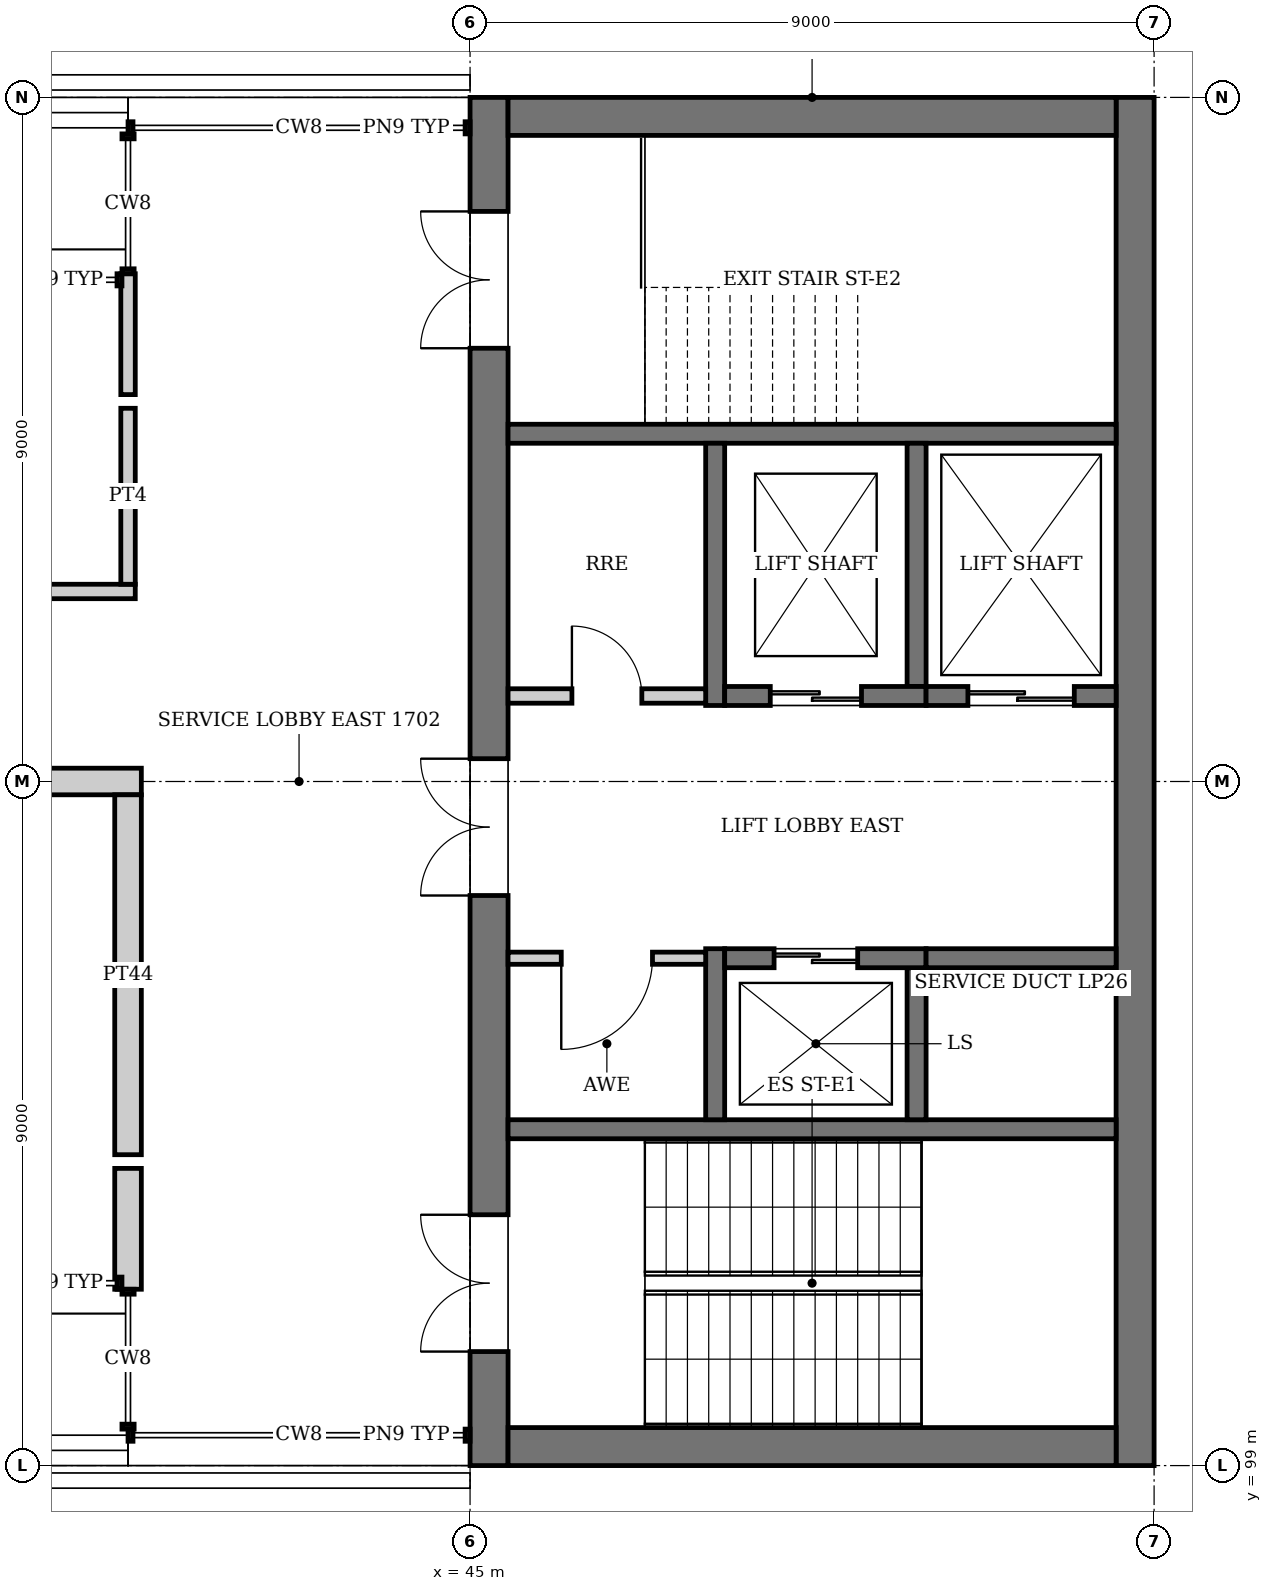
"""IFC4 building model, lengths in metres.
Left out: names, types, materials, properties, quantities, classifications, styles, units other than length and angle.
Written with IfcOpenShell. Run it as: python <this file> out.ifc"""

import sys

from ifc_helpers import new_model, si_unit, direction, frame, frame_2d, origin, place, context, subcontext, project, spatial, rectangle, extrude, element, fill, save


model = new_model("IFC4")
c1 = context("Model", 3, precision=1e-05, world=origin(), true_north=direction((0.0, 1.0)))
c2 = subcontext(c1, "Body", "Model", "MODEL_VIEW")
j1 = project(units=[si_unit("LENGTHUNIT", "METRE"), si_unit("PLANEANGLEUNIT", "RADIAN")], contexts=[c1])
p1 = place(None, origin())
s1 = spatial("IfcSite", under=j1, at=p1, CompositionType="ELEMENT")
p2 = place(p1, origin())
s2 = spatial("IfcBuilding", under=s1, at=p2, CompositionType="ELEMENT")
p3 = place(p2, frame((0.0, 0.0, 71.2)))
s3 = spatial("IfcBuildingStorey", under=s2, at=p3, CompositionType="ELEMENT", Elevation=71.2)
p4 = place(p3, frame((45.25, 99.0, 0.0), z_axis=(0.0, 0.0, 1.0), x_axis=(0.0, 1.0, 0.0)))
e1 = element("IfcWall", 1, at=p4, inside=s3, PredefinedType="SHEAR", context=c2, shape_type="SweptSolid", body=[
    extrude(rectangle(XDim=18.0, YDim=0.5, at=frame_2d((9.0, 0.0))), origin(), (0.0, 0.0, 1.0), 4.65),
])
p5 = place(p4, frame((1.5, 0.0, 0.0)))
e2 = element("IfcOpeningElement", 2, at=p5, cuts=e1, PredefinedType="OPENING", context=c2, shape_type="SweptSolid", body=[
    extrude(rectangle(XDim=1.8, YDim=2.1, at=frame_2d((0.9, 1.05))), frame((0.0, 0.26, 0.0), z_axis=(0.0, -1.0, 0.0), x_axis=(1.0, 0.0, 0.0)), (0.0, 0.0, 1.0), 0.52),
])
p6 = place(p4, frame((14.7, 0.0, 0.0)))
e3 = element("IfcOpeningElement", 3, at=p6, cuts=e1, PredefinedType="OPENING", context=c2, shape_type="SweptSolid", body=[
    extrude(rectangle(XDim=1.8, YDim=2.1, at=frame_2d((0.9, 1.05))), frame((0.0, 0.26, 0.0), z_axis=(0.0, -1.0, 0.0), x_axis=(1.0, 0.0, 0.0)), (0.0, 0.0, 1.0), 0.52),
])
p7 = place(p4, frame((7.5, 0.0, 0.0)))
e4 = element("IfcOpeningElement", 4, at=p7, cuts=e1, PredefinedType="OPENING", context=c2, shape_type="SweptSolid", body=[
    extrude(rectangle(XDim=1.8, YDim=2.1, at=frame_2d((0.9, 1.05))), frame((0.0, 0.26, 0.0), z_axis=(0.0, -1.0, 0.0), x_axis=(1.0, 0.0, 0.0)), (0.0, 0.0, 1.0), 0.52),
])
p8 = place(p3, frame((53.75, 99.0, 0.0), z_axis=(0.0, 0.0, 1.0), x_axis=(0.0, 1.0, 0.0)))
e5 = element("IfcWall", 5, at=p8, inside=s3, PredefinedType="SHEAR", context=c2, shape_type="SweptSolid", body=[
    extrude(rectangle(XDim=18.0, YDim=0.5, at=frame_2d((9.0, 0.0))), origin(), (0.0, 0.0, 1.0), 4.65),
])
for number, where, z_axis, x_axis in (
    (6, (45.5, 99.25, 0.0), (0.0, 0.0, 1.0), (1.0, 0.0, 0.0)),
    (7, (45.5, 116.75, 0.0), (0.0, 0.0, 1.0), (1.0, 0.0, 0.0)),
):
    element("IfcWall", number, at=place(p3, frame(where, z_axis=z_axis, x_axis=x_axis)), inside=s3, PredefinedType="SHEAR", context=c2, shape_type="SweptSolid", body=[
        extrude(rectangle(XDim=8.0, YDim=0.5, at=frame_2d((4.0, 0.0))), origin(), (0.0, 0.0, 1.0), 4.65),
    ])
for number, where, z_axis, x_axis in (
    (8, (13.5, 99.3, 0.0), (0.0, 0.0, 1.0), (1.0, 0.0, 0.0)),
    (9, (13.5, 116.7, 0.0), (0.0, 0.0, 1.0), (1.0, 0.0, 0.0)),
):
    element("IfcWall", number, at=place(p3, frame(where, z_axis=z_axis, x_axis=x_axis)), inside=s3, PredefinedType="PARAPET", context=c2, shape_type="SweptSolid", body=[
        extrude(rectangle(XDim=27.0, YDim=0.2, at=frame_2d((13.5, 0.0))), origin(), (0.0, 0.0, 1.0), 1.1),
    ])
for number, where, z_axis, x_axis in (
    (10, (9.0, 98.803, 4.65), (0.0, 0.0, 1.0), (1.0, 0.0, 0.0)),
    (11, (9.0, 117.197, 4.65), (0.0, 0.0, 1.0), (1.0, 0.0, 0.0)),
):
    element("IfcWall", number, at=place(p3, frame(where, z_axis=z_axis, x_axis=x_axis)), inside=s3, PredefinedType="PARAPET", context=c2, shape_type="SweptSolid", body=[
        extrude(rectangle(XDim=36.0, YDim=0.2, at=frame_2d((18.0, 0.0))), origin(), (0.0, 0.0, 1.0), 1.29),
    ])
p9 = place(p3, frame((12.0, 101.0, 4.8), z_axis=(0.0, 0.0, 1.0), x_axis=(1.0, 0.0, 0.0)))
e12 = element("IfcWall", 12, at=p9, inside=s3, PredefinedType="SOLIDWALL", context=c2, shape_type="SweptSolid", body=[
    extrude(rectangle(XDim=30.0, YDim=0.18, at=frame_2d((15.0, 0.0))), origin(), (0.0, 0.0, 1.0), 1.6),
])
p10 = place(p3, frame((9.0, 103.0, 4.8), z_axis=(0.0, 0.0, 1.0), x_axis=(1.0, 0.0, 0.0)))
e13 = element("IfcWall", 13, at=p10, inside=s3, PredefinedType="SOLIDWALL", context=c2, shape_type="SweptSolid", body=[
    extrude(rectangle(XDim=36.0, YDim=0.18, at=frame_2d((18.0, 0.0))), origin(), (0.0, 0.0, 1.0), 3.0),
])
p11 = place(p3, frame((12.0, 115.0, 4.8), z_axis=(0.0, 0.0, 1.0), x_axis=(1.0, 0.0, 0.0)))
e14 = element("IfcWall", 14, at=p11, inside=s3, PredefinedType="SOLIDWALL", context=c2, shape_type="SweptSolid", body=[
    extrude(rectangle(XDim=30.0, YDim=0.18, at=frame_2d((15.0, 0.0))), origin(), (0.0, 0.0, 1.0), 1.6),
])
p12 = place(p3, frame((9.0, 113.0, 4.8), z_axis=(0.0, 0.0, 1.0), x_axis=(1.0, 0.0, 0.0)))
e15 = element("IfcWall", 15, at=p12, inside=s3, PredefinedType="SOLIDWALL", context=c2, shape_type="SweptSolid", body=[
    extrude(rectangle(XDim=36.0, YDim=0.18, at=frame_2d((18.0, 0.0))), origin(), (0.0, 0.0, 1.0), 3.0),
])
for number, where, z_axis, x_axis in (
    (16, (45.5, 103.425, 0.0), (0.0, 0.0, 1.0), (1.0, 0.0, 0.0)),
    (17, (45.5, 112.575, 0.0), (0.0, 0.0, 1.0), (1.0, 0.0, 0.0)),
):
    element("IfcWall", number, at=place(p3, frame(where, z_axis=z_axis, x_axis=x_axis)), inside=s3, PredefinedType="SOLIDWALL", context=c2, shape_type="SweptSolid", body=[
        extrude(rectangle(XDim=8.0, YDim=0.25, at=frame_2d((4.0, 0.0))), origin(), (0.0, 0.0, 1.0), 4.55),
    ])
p13 = place(p3, frame((48.225, 103.55, 0.0), z_axis=(0.0, 0.0, 1.0), x_axis=(0.0, 1.0, 0.0)))
e18 = element("IfcWall", 18, at=p13, inside=s3, PredefinedType="SOLIDWALL", context=c2, shape_type="SweptSolid", body=[
    extrude(rectangle(XDim=2.25, YDim=0.25, at=frame_2d((1.125, 0.0))), origin(), (0.0, 0.0, 1.0), 4.55),
])
p14 = place(p3, frame((50.875, 103.55, 0.0), z_axis=(0.0, 0.0, 1.0), x_axis=(0.0, 1.0, 0.0)))
e19 = element("IfcWall", 19, at=p14, inside=s3, PredefinedType="SOLIDWALL", context=c2, shape_type="SweptSolid", body=[
    extrude(rectangle(XDim=2.0, YDim=0.25, at=frame_2d((1.0, 0.0))), origin(), (0.0, 0.0, 1.0), 4.55),
])
p15 = place(p3, frame((48.35, 105.675, 0.0), z_axis=(0.0, 0.0, 1.0), x_axis=(1.0, 0.0, 0.0)))
e20 = element("IfcWall", 20, at=p15, inside=s3, PredefinedType="SOLIDWALL", context=c2, shape_type="SweptSolid", body=[
    extrude(rectangle(XDim=2.65, YDim=0.25, at=frame_2d((1.325, 0.0))), origin(), (0.0, 0.0, 1.0), 4.55),
])
p16 = place(p15, frame((0.65, 0.0, 0.0)))
e21 = element("IfcOpeningElement", 21, at=p16, cuts=e20, PredefinedType="OPENING", context=c2, shape_type="SweptSolid", body=[
    extrude(rectangle(XDim=1.1, YDim=2.1, at=frame_2d((0.55, 1.05))), frame((0.0, 0.135, 0.0), z_axis=(0.0, -1.0, 0.0), x_axis=(1.0, 0.0, 0.0)), (0.0, 0.0, 1.0), 0.27),
])
p17 = place(p3, frame((51.0, 105.675, 0.0), z_axis=(0.0, 0.0, 1.0), x_axis=(1.0, 0.0, 0.0)))
e22 = element("IfcWall", 22, at=p17, inside=s3, PredefinedType="SOLIDWALL", context=c2, shape_type="SweptSolid", body=[
    extrude(rectangle(XDim=2.5, YDim=0.25, at=frame_2d((1.25, 0.0))), origin(), (0.0, 0.0, 1.0), 4.55),
])
p18 = place(p3, frame((48.225, 109.0, 0.0), z_axis=(0.0, 0.0, 1.0), x_axis=(0.0, 1.0, 0.0)))
e23 = element("IfcWall", 23, at=p18, inside=s3, PredefinedType="SOLIDWALL", context=c2, shape_type="SweptSolid", body=[
    extrude(rectangle(XDim=3.45, YDim=0.25, at=frame_2d((1.725, 0.0))), origin(), (0.0, 0.0, 1.0), 4.55),
])
p19 = place(p3, frame((50.875, 109.25, 0.0), z_axis=(0.0, 0.0, 1.0), x_axis=(0.0, 1.0, 0.0)))
e24 = element("IfcWall", 24, at=p19, inside=s3, PredefinedType="SOLIDWALL", context=c2, shape_type="SweptSolid", body=[
    extrude(rectangle(XDim=3.2, YDim=0.25, at=frame_2d((1.6, 0.0))), origin(), (0.0, 0.0, 1.0), 4.55),
])
p20 = place(p3, frame((48.35, 109.125, 0.0), z_axis=(0.0, 0.0, 1.0), x_axis=(1.0, 0.0, 0.0)))
e25 = element("IfcWall", 25, at=p20, inside=s3, PredefinedType="SOLIDWALL", context=c2, shape_type="SweptSolid", body=[
    extrude(rectangle(XDim=2.65, YDim=0.25, at=frame_2d((1.325, 0.0))), origin(), (0.0, 0.0, 1.0), 4.55),
])
p21 = place(p20, frame((0.6, 0.0, 0.0)))
e26 = element("IfcOpeningElement", 26, at=p21, cuts=e25, PredefinedType="OPENING", context=c2, shape_type="SweptSolid", body=[
    extrude(rectangle(XDim=1.2, YDim=2.1, at=frame_2d((0.6, 1.05))), frame((0.0, 0.135, 0.0), z_axis=(0.0, -1.0, 0.0), x_axis=(1.0, 0.0, 0.0)), (0.0, 0.0, 1.0), 0.27),
])
p22 = place(p3, frame((51.0, 109.125, 0.0), z_axis=(0.0, 0.0, 1.0), x_axis=(1.0, 0.0, 0.0)))
e27 = element("IfcWall", 27, at=p22, inside=s3, PredefinedType="SOLIDWALL", context=c2, shape_type="SweptSolid", body=[
    extrude(rectangle(XDim=2.5, YDim=0.25, at=frame_2d((1.25, 0.0))), origin(), (0.0, 0.0, 1.0), 4.55),
])
p23 = place(p22, frame((0.55, 0.0, 0.0)))
e28 = element("IfcOpeningElement", 28, at=p23, cuts=e27, PredefinedType="OPENING", context=c2, shape_type="SweptSolid", body=[
    extrude(rectangle(XDim=1.4, YDim=2.4, at=frame_2d((0.7, 1.2))), frame((0.0, 0.135, 0.0), z_axis=(0.0, -1.0, 0.0), x_axis=(1.0, 0.0, 0.0)), (0.0, 0.0, 1.0), 0.27),
])
p24 = place(p3, frame((45.5, 105.675, 0.0), z_axis=(0.0, 0.0, 1.0), x_axis=(1.0, 0.0, 0.0)))
e29 = element("IfcWall", 29, at=p24, inside=s3, PredefinedType="PARTITIONING", context=c2, shape_type="SweptSolid", body=[
    extrude(rectangle(XDim=2.6, YDim=0.16, at=frame_2d((1.3, 0.0))), origin(), (0.0, 0.0, 1.0), 4.55),
])
p25 = place(p24, frame((0.7, 0.0, 0.0)))
e30 = element("IfcOpeningElement", 30, at=p25, cuts=e29, PredefinedType="OPENING", context=c2, shape_type="SweptSolid", body=[
    extrude(rectangle(XDim=1.2, YDim=2.1, at=frame_2d((0.6, 1.05))), frame((0.0, 0.09, 0.0), z_axis=(0.0, -1.0, 0.0), x_axis=(1.0, 0.0, 0.0)), (0.0, 0.0, 1.0), 0.18),
])
p26 = place(p3, frame((45.5, 109.125, 0.0), z_axis=(0.0, 0.0, 1.0), x_axis=(1.0, 0.0, 0.0)))
e31 = element("IfcWall", 31, at=p26, inside=s3, PredefinedType="PARTITIONING", context=c2, shape_type="SweptSolid", body=[
    extrude(rectangle(XDim=2.6, YDim=0.19, at=frame_2d((1.3, 0.0))), origin(), (0.0, 0.0, 1.0), 4.55),
])
p27 = place(p26, frame((0.84, 0.0, 0.0)))
e32 = element("IfcOpeningElement", 32, at=p27, cuts=e31, PredefinedType="OPENING", context=c2, shape_type="SweptSolid", body=[
    extrude(rectangle(XDim=0.92, YDim=2.1, at=frame_2d((0.46, 1.05))), frame((0.0, 0.105, 0.0), z_axis=(0.0, -1.0, 0.0), x_axis=(1.0, 0.0, 0.0)), (0.0, 0.0, 1.0), 0.21),
])
p28 = place(p3, frame((31.675, 108.0, 0.0), z_axis=(0.0, 0.0, 1.0), x_axis=(1.0, 0.0, 0.0)))
e33 = element("IfcWall", 33, at=p28, inside=s3, PredefinedType="PARTITIONING", context=c2, shape_type="SweptSolid", body=[
    extrude(rectangle(XDim=9.0, YDim=0.35, at=frame_2d((4.5, 0.0))), origin(), (0.0, 0.0, 1.0), 3.858),
])
p29 = place(p28, frame((1.325, 0.0, 0.0)))
e34 = element("IfcOpeningElement", 34, at=p29, cuts=e33, PredefinedType="OPENING", context=c2, shape_type="SweptSolid", body=[
    extrude(rectangle(XDim=1.5, YDim=2.4, at=frame_2d((0.75, 1.2))), frame((0.0, 0.185, 0.0), z_axis=(0.0, -1.0, 0.0), x_axis=(1.0, 0.0, 0.0)), (0.0, 0.0, 1.0), 0.37),
])
p30 = place(p3, frame((31.675, 110.5, 0.0), z_axis=(0.0, 0.0, 1.0), x_axis=(1.0, 0.0, 0.0)))
e35 = element("IfcWall", 35, at=p30, inside=s3, PredefinedType="PARTITIONING", context=c2, shape_type="SweptSolid", body=[
    extrude(rectangle(XDim=8.92, YDim=0.19, at=frame_2d((4.46, 0.0))), origin(), (0.0, 0.0, 1.0), 3.858),
])
p31 = place(p30, frame((3.325, 0.0, 0.0)))
e36 = element("IfcOpeningElement", 36, at=p31, cuts=e35, PredefinedType="OPENING", context=c2, shape_type="SweptSolid", body=[
    extrude(rectangle(XDim=2.0, YDim=2.7, at=frame_2d((1.0, 1.35))), frame((0.0, 0.105, 0.0), z_axis=(0.0, -1.0, 0.0), x_axis=(1.0, 0.0, 0.0)), (0.0, 0.0, 1.0), 0.21),
])
p32 = place(p3, frame((40.5, 101.32, 0.0), z_axis=(0.0, 0.0, 1.0), x_axis=(0.0, 1.0, 0.0)))
e37 = element("IfcWall", 37, at=p32, inside=s3, PredefinedType="PARTITIONING", context=c2, shape_type="SweptSolid", body=[
    extrude(rectangle(XDim=1.59, YDim=0.35, at=frame_2d((0.795, 0.0))), origin(), (0.0, 0.0, 1.0), 3.858),
])
p33 = place(p3, frame((40.5, 103.09, 0.0), z_axis=(0.0, 0.0, 1.0), x_axis=(0.0, 1.0, 0.0)))
e38 = element("IfcWall", 38, at=p33, inside=s3, PredefinedType="PARTITIONING", context=c2, shape_type="SweptSolid", body=[
    extrude(rectangle(XDim=4.735, YDim=0.35, at=frame_2d((2.367, 0.0))), origin(), (0.0, 0.0, 1.0), 3.858),
])
p34 = place(p3, frame((40.5, 110.595, 0.0), z_axis=(0.0, 0.0, 1.0), x_axis=(0.0, 1.0, 0.0)))
e39 = element("IfcWall", 39, at=p34, inside=s3, PredefinedType="PARTITIONING", context=c2, shape_type="SweptSolid", body=[
    extrude(rectangle(XDim=2.315, YDim=0.19, at=frame_2d((1.157, 0.0))), origin(), (0.0, 0.0, 1.0), 3.858),
])
p35 = place(p3, frame((40.5, 113.09, 0.0), z_axis=(0.0, 0.0, 1.0), x_axis=(0.0, 1.0, 0.0)))
e40 = element("IfcWall", 40, at=p35, inside=s3, PredefinedType="PARTITIONING", context=c2, shape_type="SweptSolid", body=[
    extrude(rectangle(XDim=1.59, YDim=0.19, at=frame_2d((0.795, 0.0))), origin(), (0.0, 0.0, 1.0), 3.858),
])
p36 = place(p16, origin())
e41 = element("IfcDoor", 41, at=p36, inside=s3, OperationType="DOUBLE_DOOR_SLIDING", PredefinedType="DOOR", context=c2, shape_type="SweptSolid", body=[
    extrude(rectangle(XDim=1.1, YDim=2.1, at=frame_2d((0.55, 1.05))), frame((0.0, 0.025, 0.0), z_axis=(0.0, -1.0, 0.0), x_axis=(1.0, 0.0, 0.0)), (0.0, 0.0, 1.0), 0.05),
])
fill(e21, e41)
p37 = place(p21, origin())
e42 = element("IfcDoor", 42, at=p37, inside=s3, OperationType="DOUBLE_DOOR_SLIDING", PredefinedType="DOOR", context=c2, shape_type="SweptSolid", body=[
    extrude(rectangle(XDim=1.2, YDim=2.1, at=frame_2d((0.6, 1.05))), frame((0.0, 0.025, 0.0), z_axis=(0.0, -1.0, 0.0), x_axis=(1.0, 0.0, 0.0)), (0.0, 0.0, 1.0), 0.05),
])
fill(e26, e42)
p38 = place(p23, origin())
e43 = element("IfcDoor", 43, at=p38, inside=s3, OperationType="DOUBLE_DOOR_SLIDING", PredefinedType="DOOR", context=c2, shape_type="SweptSolid", body=[
    extrude(rectangle(XDim=1.4, YDim=2.4, at=frame_2d((0.7, 1.2))), frame((0.0, 0.025, 0.0), z_axis=(0.0, -1.0, 0.0), x_axis=(1.0, 0.0, 0.0)), (0.0, 0.0, 1.0), 0.05),
])
fill(e28, e43)
p39 = place(p5, origin())
e44 = element("IfcDoor", 44, at=p39, inside=s3, OperationType="DOUBLE_DOOR_SINGLE_SWING", PredefinedType="DOOR", context=c2, shape_type="SweptSolid", body=[
    extrude(rectangle(XDim=1.8, YDim=2.1, at=frame_2d((0.9, 1.05))), frame((0.0, 0.025, 0.0), z_axis=(0.0, -1.0, 0.0), x_axis=(1.0, 0.0, 0.0)), (0.0, 0.0, 1.0), 0.05),
])
fill(e2, e44)
p40 = place(p6, origin())
e45 = element("IfcDoor", 45, at=p40, inside=s3, OperationType="DOUBLE_DOOR_SINGLE_SWING", PredefinedType="DOOR", context=c2, shape_type="SweptSolid", body=[
    extrude(rectangle(XDim=1.8, YDim=2.1, at=frame_2d((0.9, 1.05))), frame((0.0, 0.025, 0.0), z_axis=(0.0, -1.0, 0.0), x_axis=(1.0, 0.0, 0.0)), (0.0, 0.0, 1.0), 0.05),
])
fill(e3, e45)
p41 = place(p7, origin())
e46 = element("IfcDoor", 46, at=p41, inside=s3, OperationType="DOUBLE_DOOR_SINGLE_SWING", PredefinedType="DOOR", context=c2, shape_type="SweptSolid", body=[
    extrude(rectangle(XDim=1.8, YDim=2.1, at=frame_2d((0.9, 1.05))), frame((0.0, 0.025, 0.0), z_axis=(0.0, -1.0, 0.0), x_axis=(1.0, 0.0, 0.0)), (0.0, 0.0, 1.0), 0.05),
])
fill(e4, e46)
p42 = place(p25, frame((1.2, 0.0, 0.0), z_axis=(0.0, 0.0, 1.0), x_axis=(-1.0, 0.0, 0.0)))
e47 = element("IfcDoor", 47, at=p42, inside=s3, OperationType="SINGLE_SWING_RIGHT", PredefinedType="DOOR", context=c2, shape_type="SweptSolid", body=[
    extrude(rectangle(XDim=1.2, YDim=2.1, at=frame_2d((0.6, 1.05))), frame((0.0, 0.025, 0.0), z_axis=(0.0, -1.0, 0.0), x_axis=(1.0, 0.0, 0.0)), (0.0, 0.0, 1.0), 0.05),
])
fill(e30, e47)
p43 = place(p27, origin())
e48 = element("IfcDoor", 48, at=p43, inside=s3, OperationType="SINGLE_SWING_LEFT", PredefinedType="DOOR", context=c2, shape_type="SweptSolid", body=[
    extrude(rectangle(XDim=0.92, YDim=2.1, at=frame_2d((0.46, 1.05))), frame((0.0, 0.025, 0.0), z_axis=(0.0, -1.0, 0.0), x_axis=(1.0, 0.0, 0.0)), (0.0, 0.0, 1.0), 0.05),
])
fill(e32, e48)
save(model, sys.argv[1])
